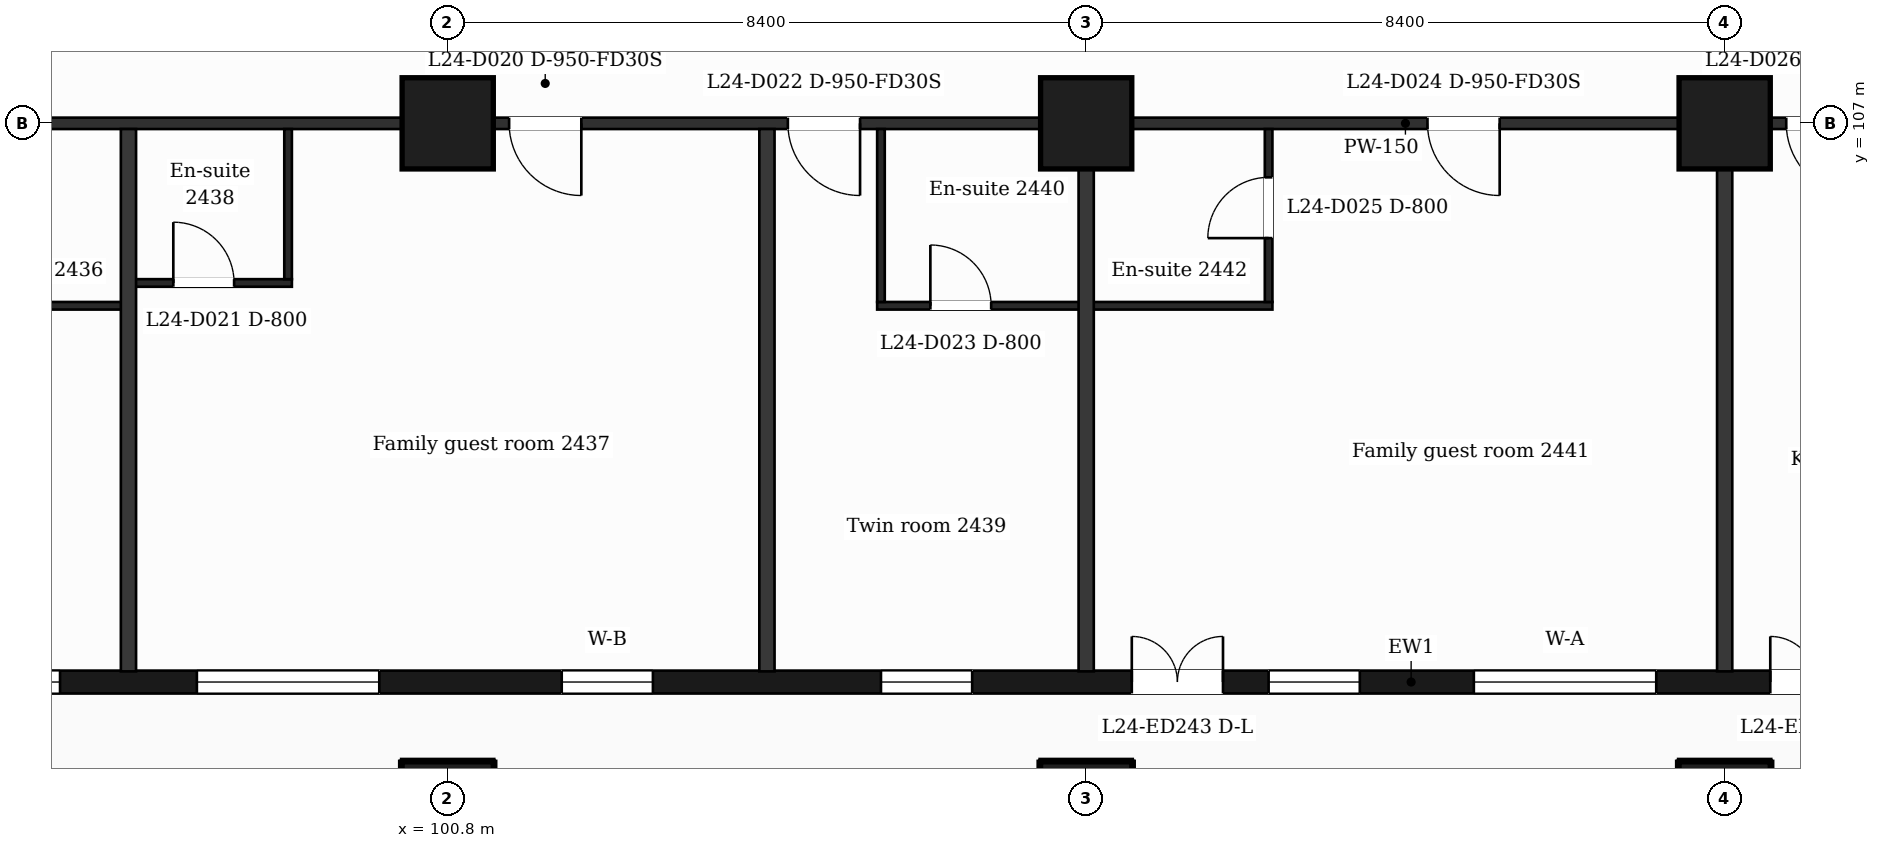
"""IFC4 building model, lengths in metres.
Left out: names, types, materials, properties, quantities, classifications, styles, units other than length and angle.
Written with IfcOpenShell. Run it as: python <this file> out.ifc"""

import sys

from ifc_helpers import new_model, si_unit, direction, frame, frame_2d, origin, origin_2d, place, context, subcontext, project, spatial, rectangle, extrude, element, fill, save


model = new_model("IFC4")
c1 = context("Model", 3, precision=1e-05, world=origin(), true_north=direction((0.0, 1.0)))
c2 = subcontext(c1, "Body", "Model", "MODEL_VIEW")
j1 = project(units=[si_unit("LENGTHUNIT", "METRE"), si_unit("PLANEANGLEUNIT", "RADIAN")], contexts=[c1])
p1 = place(None, origin())
s1 = spatial("IfcSite", under=j1, at=p1, CompositionType="ELEMENT")
p2 = place(p1, origin())
s2 = spatial("IfcBuilding", under=s1, at=p2, CompositionType="ELEMENT")
p3 = place(p2, frame((0.0, 0.0, 105.8)))
s3 = spatial("IfcBuildingStorey", under=s2, at=p3, CompositionType="ELEMENT", Elevation=105.8)
for number, where, z_axis, x_axis in (
    (1, (100.8, 98.0, 0.0), (0.0, 0.0, 1.0), (1.0, 0.0, 0.0)),
    (2, (109.2, 98.0, 0.0), (0.0, 0.0, 1.0), (1.0, 0.0, 0.0)),
    (3, (117.6, 98.0, 0.0), (0.0, 0.0, 1.0), (1.0, 0.0, 0.0)),
    (4, (100.8, 107.0, 0.0), (0.0, 0.0, 1.0), (1.0, 0.0, 0.0)),
    (5, (109.2, 107.0, 0.0), (0.0, 0.0, 1.0), (1.0, 0.0, 0.0)),
    (6, (117.6, 107.0, 0.0), (0.0, 0.0, 1.0), (1.0, 0.0, 0.0)),
):
    element("IfcColumn", number, at=place(p3, frame(where, z_axis=z_axis, x_axis=x_axis)), inside=s3, PredefinedType="COLUMN", context=c2, shape_type="SweptSolid", body=[
        extrude(rectangle(XDim=1.2, YDim=1.2, at=origin_2d()), origin(), (0.0, 0.0, 1.0), 3.7),
    ])
p4 = place(p3, frame((89.85, 99.65, 0.0), z_axis=(0.0, 0.0, 1.0), x_axis=(1.0, 0.0, 0.0)))
e7 = element("IfcWall", 7, at=p4, inside=s3, PredefinedType="SOLIDWALL", context=c2, shape_type="SweptSolid", body=[
    extrude(rectangle(XDim=47.25, YDim=0.3, at=frame_2d((23.625, 0.0))), origin(), (0.0, 0.0, 1.0), 3.38),
])
p5 = place(p4, frame((0.725, 0.0, 0.9)))
e8 = element("IfcOpeningElement", 8, at=p5, cuts=e7, PredefinedType="OPENING", context=c2, shape_type="SweptSolid", body=[
    extrude(rectangle(XDim=1.2, YDim=2.1, at=frame_2d((0.6, 1.05))), frame((0.0, 0.16, 0.0), z_axis=(0.0, -1.0, 0.0), x_axis=(1.0, 0.0, 0.0)), (0.0, 0.0, 1.0), 0.32),
])
p6 = place(p4, frame((3.45, 0.0, 0.9)))
e9 = element("IfcOpeningElement", 9, at=p6, cuts=e7, PredefinedType="OPENING", context=c2, shape_type="SweptSolid", body=[
    extrude(rectangle(XDim=2.4, YDim=2.1, at=frame_2d((1.2, 1.05))), frame((0.0, 0.16, 0.0), z_axis=(0.0, -1.0, 0.0), x_axis=(1.0, 0.0, 0.0)), (0.0, 0.0, 1.0), 0.32),
])
p7 = place(p4, frame((7.65, 0.0, 0.9)))
e10 = element("IfcOpeningElement", 10, at=p7, cuts=e7, PredefinedType="OPENING", context=c2, shape_type="SweptSolid", body=[
    extrude(rectangle(XDim=2.4, YDim=2.1, at=frame_2d((1.2, 1.05))), frame((0.0, 0.16, 0.0), z_axis=(0.0, -1.0, 0.0), x_axis=(1.0, 0.0, 0.0)), (0.0, 0.0, 1.0), 0.32),
])
p8 = place(p4, frame((12.45, 0.0, 0.9)))
e11 = element("IfcOpeningElement", 11, at=p8, cuts=e7, PredefinedType="OPENING", context=c2, shape_type="SweptSolid", body=[
    extrude(rectangle(XDim=1.2, YDim=2.1, at=frame_2d((0.6, 1.05))), frame((0.0, 0.16, 0.0), z_axis=(0.0, -1.0, 0.0), x_axis=(1.0, 0.0, 0.0)), (0.0, 0.0, 1.0), 0.32),
])
p9 = place(p4, frame((16.65, 0.0, 0.9)))
e12 = element("IfcOpeningElement", 12, at=p9, cuts=e7, PredefinedType="OPENING", context=c2, shape_type="SweptSolid", body=[
    extrude(rectangle(XDim=1.2, YDim=2.1, at=frame_2d((0.6, 1.05))), frame((0.0, 0.16, 0.0), z_axis=(0.0, -1.0, 0.0), x_axis=(1.0, 0.0, 0.0)), (0.0, 0.0, 1.0), 0.32),
])
p10 = place(p4, frame((19.95, 0.0, 0.0)))
e13 = element("IfcOpeningElement", 13, at=p10, cuts=e7, PredefinedType="OPENING", context=c2, shape_type="SweptSolid", body=[
    extrude(rectangle(XDim=1.2, YDim=2.4, at=frame_2d((0.6, 1.2))), frame((0.0, 0.16, 0.0), z_axis=(0.0, -1.0, 0.0), x_axis=(1.0, 0.0, 0.0)), (0.0, 0.0, 1.0), 0.32),
])
p11 = place(p4, frame((21.75, 0.0, 0.9)))
e14 = element("IfcOpeningElement", 14, at=p11, cuts=e7, PredefinedType="OPENING", context=c2, shape_type="SweptSolid", body=[
    extrude(rectangle(XDim=1.2, YDim=2.1, at=frame_2d((0.6, 1.05))), frame((0.0, 0.16, 0.0), z_axis=(0.0, -1.0, 0.0), x_axis=(1.0, 0.0, 0.0)), (0.0, 0.0, 1.0), 0.32),
])
p12 = place(p4, frame((24.45, 0.0, 0.9)))
e15 = element("IfcOpeningElement", 15, at=p12, cuts=e7, PredefinedType="OPENING", context=c2, shape_type="SweptSolid", body=[
    extrude(rectangle(XDim=2.4, YDim=2.1, at=frame_2d((1.2, 1.05))), frame((0.0, 0.16, 0.0), z_axis=(0.0, -1.0, 0.0), x_axis=(1.0, 0.0, 0.0)), (0.0, 0.0, 1.0), 0.32),
])
p13 = place(p4, frame((28.35, 0.0, 0.0)))
e16 = element("IfcOpeningElement", 16, at=p13, cuts=e7, PredefinedType="OPENING", context=c2, shape_type="SweptSolid", body=[
    extrude(rectangle(XDim=1.2, YDim=2.4, at=frame_2d((0.6, 1.2))), frame((0.0, 0.16, 0.0), z_axis=(0.0, -1.0, 0.0), x_axis=(1.0, 0.0, 0.0)), (0.0, 0.0, 1.0), 0.32),
])
p14 = place(p4, frame((30.15, 0.0, 0.9)))
e17 = element("IfcOpeningElement", 17, at=p14, cuts=e7, PredefinedType="OPENING", context=c2, shape_type="SweptSolid", body=[
    extrude(rectangle(XDim=1.2, YDim=2.1, at=frame_2d((0.6, 1.05))), frame((0.0, 0.16, 0.0), z_axis=(0.0, -1.0, 0.0), x_axis=(1.0, 0.0, 0.0)), (0.0, 0.0, 1.0), 0.32),
])
p15 = place(p4, frame((32.85, 0.0, 0.9)))
e18 = element("IfcOpeningElement", 18, at=p15, cuts=e7, PredefinedType="OPENING", context=c2, shape_type="SweptSolid", body=[
    extrude(rectangle(XDim=2.4, YDim=2.1, at=frame_2d((1.2, 1.05))), frame((0.0, 0.16, 0.0), z_axis=(0.0, -1.0, 0.0), x_axis=(1.0, 0.0, 0.0)), (0.0, 0.0, 1.0), 0.32),
])
p16 = place(p4, frame((37.05, 0.0, 0.9)))
e19 = element("IfcOpeningElement", 19, at=p16, cuts=e7, PredefinedType="OPENING", context=c2, shape_type="SweptSolid", body=[
    extrude(rectangle(XDim=2.4, YDim=2.1, at=frame_2d((1.2, 1.05))), frame((0.0, 0.16, 0.0), z_axis=(0.0, -1.0, 0.0), x_axis=(1.0, 0.0, 0.0)), (0.0, 0.0, 1.0), 0.32),
])
p17 = place(p4, frame((41.85, 0.0, 0.9)))
e20 = element("IfcOpeningElement", 20, at=p17, cuts=e7, PredefinedType="OPENING", context=c2, shape_type="SweptSolid", body=[
    extrude(rectangle(XDim=1.2, YDim=2.1, at=frame_2d((0.6, 1.05))), frame((0.0, 0.16, 0.0), z_axis=(0.0, -1.0, 0.0), x_axis=(1.0, 0.0, 0.0)), (0.0, 0.0, 1.0), 0.32),
])
p18 = place(p4, frame((45.25, 0.0, 0.9)))
e21 = element("IfcOpeningElement", 21, at=p18, cuts=e7, PredefinedType="OPENING", context=c2, shape_type="SweptSolid", body=[
    extrude(rectangle(XDim=1.2, YDim=2.1, at=frame_2d((0.6, 1.05))), frame((0.0, 0.16, 0.0), z_axis=(0.0, -1.0, 0.0), x_axis=(1.0, 0.0, 0.0)), (0.0, 0.0, 1.0), 0.32),
])
p19 = place(p3, frame((94.15, 104.6, 0.0), z_axis=(0.0, 0.0, 1.0), x_axis=(1.0, 0.0, 0.0)))
e22 = element("IfcWall", 22, at=p19, inside=s3, PredefinedType="PARTITIONING", context=c2, shape_type="SweptSolid", body=[
    extrude(rectangle(XDim=2.45, YDim=0.1, at=frame_2d((1.225, 0.0))), origin(), (0.0, 0.0, 1.0), 3.38),
])
p20 = place(p3, frame((106.45, 104.6, 0.0), z_axis=(0.0, 0.0, 1.0), x_axis=(1.0, 0.0, 0.0)))
e23 = element("IfcWall", 23, at=p20, inside=s3, PredefinedType="PARTITIONING", context=c2, shape_type="SweptSolid", body=[
    extrude(rectangle(XDim=5.2, YDim=0.1, at=frame_2d((2.6, 0.0))), origin(), (0.0, 0.0, 1.0), 3.38),
])
p21 = place(p20, frame((0.7, 0.0, 0.0)))
e24 = element("IfcOpeningElement", 24, at=p21, cuts=e23, PredefinedType="OPENING", context=c2, shape_type="SweptSolid", body=[
    extrude(rectangle(XDim=0.8, YDim=2.1, at=frame_2d((0.4, 1.05))), frame((0.0, 0.06, 0.0), z_axis=(0.0, -1.0, 0.0), x_axis=(1.0, 0.0, 0.0)), (0.0, 0.0, 1.0), 0.12),
])
p22 = place(p3, frame((96.6, 104.9, 0.0), z_axis=(0.0, 0.0, 1.0), x_axis=(1.0, 0.0, 0.0)))
e25 = element("IfcWall", 25, at=p22, inside=s3, PredefinedType="PARTITIONING", context=c2, shape_type="SweptSolid", body=[
    extrude(rectangle(XDim=2.15, YDim=0.1, at=frame_2d((1.075, 0.0))), origin(), (0.0, 0.0, 1.0), 3.38),
])
p23 = place(p22, frame((0.59, 0.0, 0.0)))
e26 = element("IfcOpeningElement", 26, at=p23, cuts=e25, PredefinedType="OPENING", context=c2, shape_type="SweptSolid", body=[
    extrude(rectangle(XDim=0.8, YDim=2.1, at=frame_2d((0.4, 1.05))), frame((0.0, 0.06, 0.0), z_axis=(0.0, -1.0, 0.0), x_axis=(1.0, 0.0, 0.0)), (0.0, 0.0, 1.0), 0.12),
])
p24 = place(p3, frame((87.018, 107.0, 0.0), z_axis=(0.0, 0.0, 1.0), x_axis=(1.0, 0.0, 0.0)))
e27 = element("IfcWall", 27, at=p24, inside=s3, PredefinedType="PARTITIONING", context=c2, shape_type="SweptSolid", body=[
    extrude(rectangle(XDim=52.765, YDim=0.15, at=frame_2d((26.382, 0.0))), origin(), (0.0, 0.0, 1.0), 3.38),
])
p25 = place(p24, frame((1.276, 0.0, 0.0)))
e28 = element("IfcOpeningElement", 28, at=p25, cuts=e27, PredefinedType="OPENING", context=c2, shape_type="SweptSolid", body=[
    extrude(rectangle(XDim=0.95, YDim=2.1, at=frame_2d((0.475, 1.05))), frame((0.0, 0.085, 0.0), z_axis=(0.0, -1.0, 0.0), x_axis=(1.0, 0.0, 0.0)), (0.0, 0.0, 1.0), 0.17),
])
p26 = place(p24, frame((6.152, 0.0, 0.0)))
e29 = element("IfcOpeningElement", 29, at=p26, cuts=e27, PredefinedType="OPENING", context=c2, shape_type="SweptSolid", body=[
    extrude(rectangle(XDim=0.95, YDim=2.1, at=frame_2d((0.475, 1.05))), frame((0.0, 0.085, 0.0), z_axis=(0.0, -1.0, 0.0), x_axis=(1.0, 0.0, 0.0)), (0.0, 0.0, 1.0), 0.17),
])
p27 = place(p24, frame((14.59, 0.0, 0.0)))
e30 = element("IfcOpeningElement", 30, at=p27, cuts=e27, PredefinedType="OPENING", context=c2, shape_type="SweptSolid", body=[
    extrude(rectangle(XDim=0.95, YDim=2.1, at=frame_2d((0.475, 1.05))), frame((0.0, 0.085, 0.0), z_axis=(0.0, -1.0, 0.0), x_axis=(1.0, 0.0, 0.0)), (0.0, 0.0, 1.0), 0.17),
])
p28 = place(p24, frame((18.257, 0.0, 0.0)))
e31 = element("IfcOpeningElement", 31, at=p28, cuts=e27, PredefinedType="OPENING", context=c2, shape_type="SweptSolid", body=[
    extrude(rectangle(XDim=0.95, YDim=2.1, at=frame_2d((0.475, 1.05))), frame((0.0, 0.085, 0.0), z_axis=(0.0, -1.0, 0.0), x_axis=(1.0, 0.0, 0.0)), (0.0, 0.0, 1.0), 0.17),
])
p29 = place(p24, frame((26.672, 0.0, 0.0)))
e32 = element("IfcOpeningElement", 32, at=p29, cuts=e27, PredefinedType="OPENING", context=c2, shape_type="SweptSolid", body=[
    extrude(rectangle(XDim=0.95, YDim=2.1, at=frame_2d((0.475, 1.05))), frame((0.0, 0.085, 0.0), z_axis=(0.0, -1.0, 0.0), x_axis=(1.0, 0.0, 0.0)), (0.0, 0.0, 1.0), 0.17),
])
p30 = place(p24, frame((31.392, 0.0, 0.0)))
e33 = element("IfcOpeningElement", 33, at=p30, cuts=e27, PredefinedType="OPENING", context=c2, shape_type="SweptSolid", body=[
    extrude(rectangle(XDim=0.95, YDim=2.1, at=frame_2d((0.475, 1.05))), frame((0.0, 0.085, 0.0), z_axis=(0.0, -1.0, 0.0), x_axis=(1.0, 0.0, 0.0)), (0.0, 0.0, 1.0), 0.17),
])
p31 = place(p24, frame((37.182, 0.0, 0.0)))
e34 = element("IfcOpeningElement", 34, at=p31, cuts=e27, PredefinedType="OPENING", context=c2, shape_type="SweptSolid", body=[
    extrude(rectangle(XDim=0.95, YDim=2.1, at=frame_2d((0.475, 1.05))), frame((0.0, 0.085, 0.0), z_axis=(0.0, -1.0, 0.0), x_axis=(1.0, 0.0, 0.0)), (0.0, 0.0, 1.0), 0.17),
])
p32 = place(p24, frame((41.762, 0.0, 0.0)))
e35 = element("IfcOpeningElement", 35, at=p32, cuts=e27, PredefinedType="OPENING", context=c2, shape_type="SweptSolid", body=[
    extrude(rectangle(XDim=0.95, YDim=2.1, at=frame_2d((0.475, 1.05))), frame((0.0, 0.085, 0.0), z_axis=(0.0, -1.0, 0.0), x_axis=(1.0, 0.0, 0.0)), (0.0, 0.0, 1.0), 0.17),
])
p33 = place(p24, frame((49.285, 0.0, 0.0)))
e36 = element("IfcOpeningElement", 36, at=p33, cuts=e27, PredefinedType="OPENING", context=c2, shape_type="SweptSolid", body=[
    extrude(rectangle(XDim=0.95, YDim=2.1, at=frame_2d((0.475, 1.05))), frame((0.0, 0.085, 0.0), z_axis=(0.0, -1.0, 0.0), x_axis=(1.0, 0.0, 0.0)), (0.0, 0.0, 1.0), 0.17),
])
p34 = place(p3, frame((96.6, 99.79, 0.0), z_axis=(0.0, 0.0, 1.0), x_axis=(0.0, 1.0, 0.0)))
e37 = element("IfcWall", 37, at=p34, inside=s3, PredefinedType="PARTITIONING", context=c2, shape_type="SweptSolid", body=[
    extrude(rectangle(XDim=7.135, YDim=0.2, at=frame_2d((3.567, 0.0))), origin(), (0.0, 0.0, 1.0), 3.38),
])
p35 = place(p3, frame((98.7, 104.95, 0.0), z_axis=(0.0, 0.0, 1.0), x_axis=(0.0, 1.0, 0.0)))
e38 = element("IfcWall", 38, at=p35, inside=s3, PredefinedType="PARTITIONING", context=c2, shape_type="SweptSolid", body=[
    extrude(rectangle(XDim=1.975, YDim=0.1, at=frame_2d((0.988, 0.0))), origin(), (0.0, 0.0, 1.0), 3.38),
])
p36 = place(p3, frame((105.0, 99.79, 0.0), z_axis=(0.0, 0.0, 1.0), x_axis=(0.0, 1.0, 0.0)))
e39 = element("IfcWall", 39, at=p36, inside=s3, PredefinedType="PARTITIONING", context=c2, shape_type="SweptSolid", body=[
    extrude(rectangle(XDim=7.135, YDim=0.2, at=frame_2d((3.567, 0.0))), origin(), (0.0, 0.0, 1.0), 3.38),
])
p37 = place(p3, frame((106.5, 104.65, 0.0), z_axis=(0.0, 0.0, 1.0), x_axis=(0.0, 1.0, 0.0)))
e40 = element("IfcWall", 40, at=p37, inside=s3, PredefinedType="PARTITIONING", context=c2, shape_type="SweptSolid", body=[
    extrude(rectangle(XDim=2.275, YDim=0.1, at=frame_2d((1.138, 0.0))), origin(), (0.0, 0.0, 1.0), 3.38),
])
p38 = place(p3, frame((109.2, 99.79, 0.0), z_axis=(0.0, 0.0, 1.0), x_axis=(0.0, 1.0, 0.0)))
e41 = element("IfcWall", 41, at=p38, inside=s3, PredefinedType="PARTITIONING", context=c2, shape_type="SweptSolid", body=[
    extrude(rectangle(XDim=7.135, YDim=0.2, at=frame_2d((3.567, 0.0))), origin(), (0.0, 0.0, 1.0), 3.38),
])
p39 = place(p3, frame((111.6, 104.65, 0.0), z_axis=(0.0, 0.0, 1.0), x_axis=(0.0, 1.0, 0.0)))
e42 = element("IfcWall", 42, at=p39, inside=s3, PredefinedType="PARTITIONING", context=c2, shape_type="SweptSolid", body=[
    extrude(rectangle(XDim=2.275, YDim=0.1, at=frame_2d((1.138, 0.0))), origin(), (0.0, 0.0, 1.0), 3.38),
])
p40 = place(p39, frame((0.84, 0.0, 0.0)))
e43 = element("IfcOpeningElement", 43, at=p40, cuts=e42, PredefinedType="OPENING", context=c2, shape_type="SweptSolid", body=[
    extrude(rectangle(XDim=0.8, YDim=2.1, at=frame_2d((0.4, 1.05))), frame((0.0, 0.06, 0.0), z_axis=(0.0, -1.0, 0.0), x_axis=(1.0, 0.0, 0.0)), (0.0, 0.0, 1.0), 0.12),
])
p41 = place(p3, frame((117.6, 99.79, 0.0), z_axis=(0.0, 0.0, 1.0), x_axis=(0.0, 1.0, 0.0)))
e44 = element("IfcWall", 44, at=p41, inside=s3, PredefinedType="PARTITIONING", context=c2, shape_type="SweptSolid", body=[
    extrude(rectangle(XDim=7.135, YDim=0.2, at=frame_2d((3.567, 0.0))), origin(), (0.0, 0.0, 1.0), 3.38),
])
p42 = place(p6, origin())
e45 = element("IfcWindow", 45, at=p42, inside=s3, PartitioningType="SINGLE_PANEL", PredefinedType="WINDOW", context=c2, shape_type="SweptSolid", body=[
    extrude(rectangle(XDim=2.4, YDim=2.1, at=frame_2d((1.2, 1.05))), frame((0.0, 0.03, 0.0), z_axis=(0.0, -1.0, 0.0), x_axis=(1.0, 0.0, 0.0)), (0.0, 0.0, 1.0), 0.06),
])
fill(e9, e45)
p43 = place(p7, origin())
e46 = element("IfcWindow", 46, at=p43, inside=s3, PartitioningType="SINGLE_PANEL", PredefinedType="WINDOW", context=c2, shape_type="SweptSolid", body=[
    extrude(rectangle(XDim=2.4, YDim=2.1, at=frame_2d((1.2, 1.05))), frame((0.0, 0.03, 0.0), z_axis=(0.0, -1.0, 0.0), x_axis=(1.0, 0.0, 0.0)), (0.0, 0.0, 1.0), 0.06),
])
fill(e10, e46)
p44 = place(p8, origin())
e47 = element("IfcWindow", 47, at=p44, inside=s3, PartitioningType="SINGLE_PANEL", PredefinedType="WINDOW", context=c2, shape_type="SweptSolid", body=[
    extrude(rectangle(XDim=1.2, YDim=2.1, at=frame_2d((0.6, 1.05))), frame((0.0, 0.03, 0.0), z_axis=(0.0, -1.0, 0.0), x_axis=(1.0, 0.0, 0.0)), (0.0, 0.0, 1.0), 0.06),
])
fill(e11, e47)
p45 = place(p9, origin())
e48 = element("IfcWindow", 48, at=p45, inside=s3, PartitioningType="SINGLE_PANEL", PredefinedType="WINDOW", context=c2, shape_type="SweptSolid", body=[
    extrude(rectangle(XDim=1.2, YDim=2.1, at=frame_2d((0.6, 1.05))), frame((0.0, 0.03, 0.0), z_axis=(0.0, -1.0, 0.0), x_axis=(1.0, 0.0, 0.0)), (0.0, 0.0, 1.0), 0.06),
])
fill(e12, e48)
p46 = place(p10, origin())
e49 = element("IfcDoor", 49, at=p46, inside=s3, OperationType="DOUBLE_DOOR_SINGLE_SWING", PredefinedType="DOOR", context=c2, shape_type="SweptSolid", body=[
    extrude(rectangle(XDim=1.2, YDim=2.4, at=frame_2d((0.6, 1.2))), frame((0.0, 0.025, 0.0), z_axis=(0.0, -1.0, 0.0), x_axis=(1.0, 0.0, 0.0)), (0.0, 0.0, 1.0), 0.05),
])
fill(e13, e49)
p47 = place(p11, origin())
e50 = element("IfcWindow", 50, at=p47, inside=s3, PartitioningType="SINGLE_PANEL", PredefinedType="WINDOW", context=c2, shape_type="SweptSolid", body=[
    extrude(rectangle(XDim=1.2, YDim=2.1, at=frame_2d((0.6, 1.05))), frame((0.0, 0.03, 0.0), z_axis=(0.0, -1.0, 0.0), x_axis=(1.0, 0.0, 0.0)), (0.0, 0.0, 1.0), 0.06),
])
fill(e14, e50)
p48 = place(p12, origin())
e51 = element("IfcWindow", 51, at=p48, inside=s3, PartitioningType="SINGLE_PANEL", PredefinedType="WINDOW", context=c2, shape_type="SweptSolid", body=[
    extrude(rectangle(XDim=2.4, YDim=2.1, at=frame_2d((1.2, 1.05))), frame((0.0, 0.03, 0.0), z_axis=(0.0, -1.0, 0.0), x_axis=(1.0, 0.0, 0.0)), (0.0, 0.0, 1.0), 0.06),
])
fill(e15, e51)
p49 = place(p13, origin())
e52 = element("IfcDoor", 52, at=p49, inside=s3, OperationType="DOUBLE_DOOR_SINGLE_SWING", PredefinedType="DOOR", context=c2, shape_type="SweptSolid", body=[
    extrude(rectangle(XDim=1.2, YDim=2.4, at=frame_2d((0.6, 1.2))), frame((0.0, 0.025, 0.0), z_axis=(0.0, -1.0, 0.0), x_axis=(1.0, 0.0, 0.0)), (0.0, 0.0, 1.0), 0.05),
])
fill(e16, e52)
p50 = place(p27, origin())
e53 = element("IfcDoor", 53, at=p50, inside=s3, OperationType="SINGLE_SWING_RIGHT", PredefinedType="DOOR", context=c2, shape_type="SweptSolid", body=[
    extrude(rectangle(XDim=0.95, YDim=2.1, at=frame_2d((0.475, 1.05))), frame((0.0, 0.025, 0.0), z_axis=(0.0, -1.0, 0.0), x_axis=(1.0, 0.0, 0.0)), (0.0, 0.0, 1.0), 0.05),
])
fill(e30, e53)
p51 = place(p23, origin())
e54 = element("IfcDoor", 54, at=p51, inside=s3, OperationType="SINGLE_SWING_LEFT", PredefinedType="DOOR", context=c2, shape_type="SweptSolid", body=[
    extrude(rectangle(XDim=0.8, YDim=2.1, at=frame_2d((0.4, 1.05))), frame((0.0, 0.025, 0.0), z_axis=(0.0, -1.0, 0.0), x_axis=(1.0, 0.0, 0.0)), (0.0, 0.0, 1.0), 0.05),
])
fill(e26, e54)
p52 = place(p28, origin())
e55 = element("IfcDoor", 55, at=p52, inside=s3, OperationType="SINGLE_SWING_RIGHT", PredefinedType="DOOR", context=c2, shape_type="SweptSolid", body=[
    extrude(rectangle(XDim=0.95, YDim=2.1, at=frame_2d((0.475, 1.05))), frame((0.0, 0.025, 0.0), z_axis=(0.0, -1.0, 0.0), x_axis=(1.0, 0.0, 0.0)), (0.0, 0.0, 1.0), 0.05),
])
fill(e31, e55)
p53 = place(p21, origin())
e56 = element("IfcDoor", 56, at=p53, inside=s3, OperationType="SINGLE_SWING_LEFT", PredefinedType="DOOR", context=c2, shape_type="SweptSolid", body=[
    extrude(rectangle(XDim=0.8, YDim=2.1, at=frame_2d((0.4, 1.05))), frame((0.0, 0.025, 0.0), z_axis=(0.0, -1.0, 0.0), x_axis=(1.0, 0.0, 0.0)), (0.0, 0.0, 1.0), 0.05),
])
fill(e24, e56)
p54 = place(p29, origin())
e57 = element("IfcDoor", 57, at=p54, inside=s3, OperationType="SINGLE_SWING_RIGHT", PredefinedType="DOOR", context=c2, shape_type="SweptSolid", body=[
    extrude(rectangle(XDim=0.95, YDim=2.1, at=frame_2d((0.475, 1.05))), frame((0.0, 0.025, 0.0), z_axis=(0.0, -1.0, 0.0), x_axis=(1.0, 0.0, 0.0)), (0.0, 0.0, 1.0), 0.05),
])
fill(e32, e57)
p55 = place(p40, origin())
e58 = element("IfcDoor", 58, at=p55, inside=s3, OperationType="SINGLE_SWING_LEFT", PredefinedType="DOOR", context=c2, shape_type="SweptSolid", body=[
    extrude(rectangle(XDim=0.8, YDim=2.1, at=frame_2d((0.4, 1.05))), frame((0.0, 0.025, 0.0), z_axis=(0.0, -1.0, 0.0), x_axis=(1.0, 0.0, 0.0)), (0.0, 0.0, 1.0), 0.05),
])
fill(e43, e58)
p56 = place(p30, origin())
e59 = element("IfcDoor", 59, at=p56, inside=s3, OperationType="SINGLE_SWING_RIGHT", PredefinedType="DOOR", context=c2, shape_type="SweptSolid", body=[
    extrude(rectangle(XDim=0.95, YDim=2.1, at=frame_2d((0.475, 1.05))), frame((0.0, 0.025, 0.0), z_axis=(0.0, -1.0, 0.0), x_axis=(1.0, 0.0, 0.0)), (0.0, 0.0, 1.0), 0.05),
])
fill(e33, e59)
save(model, sys.argv[1])
